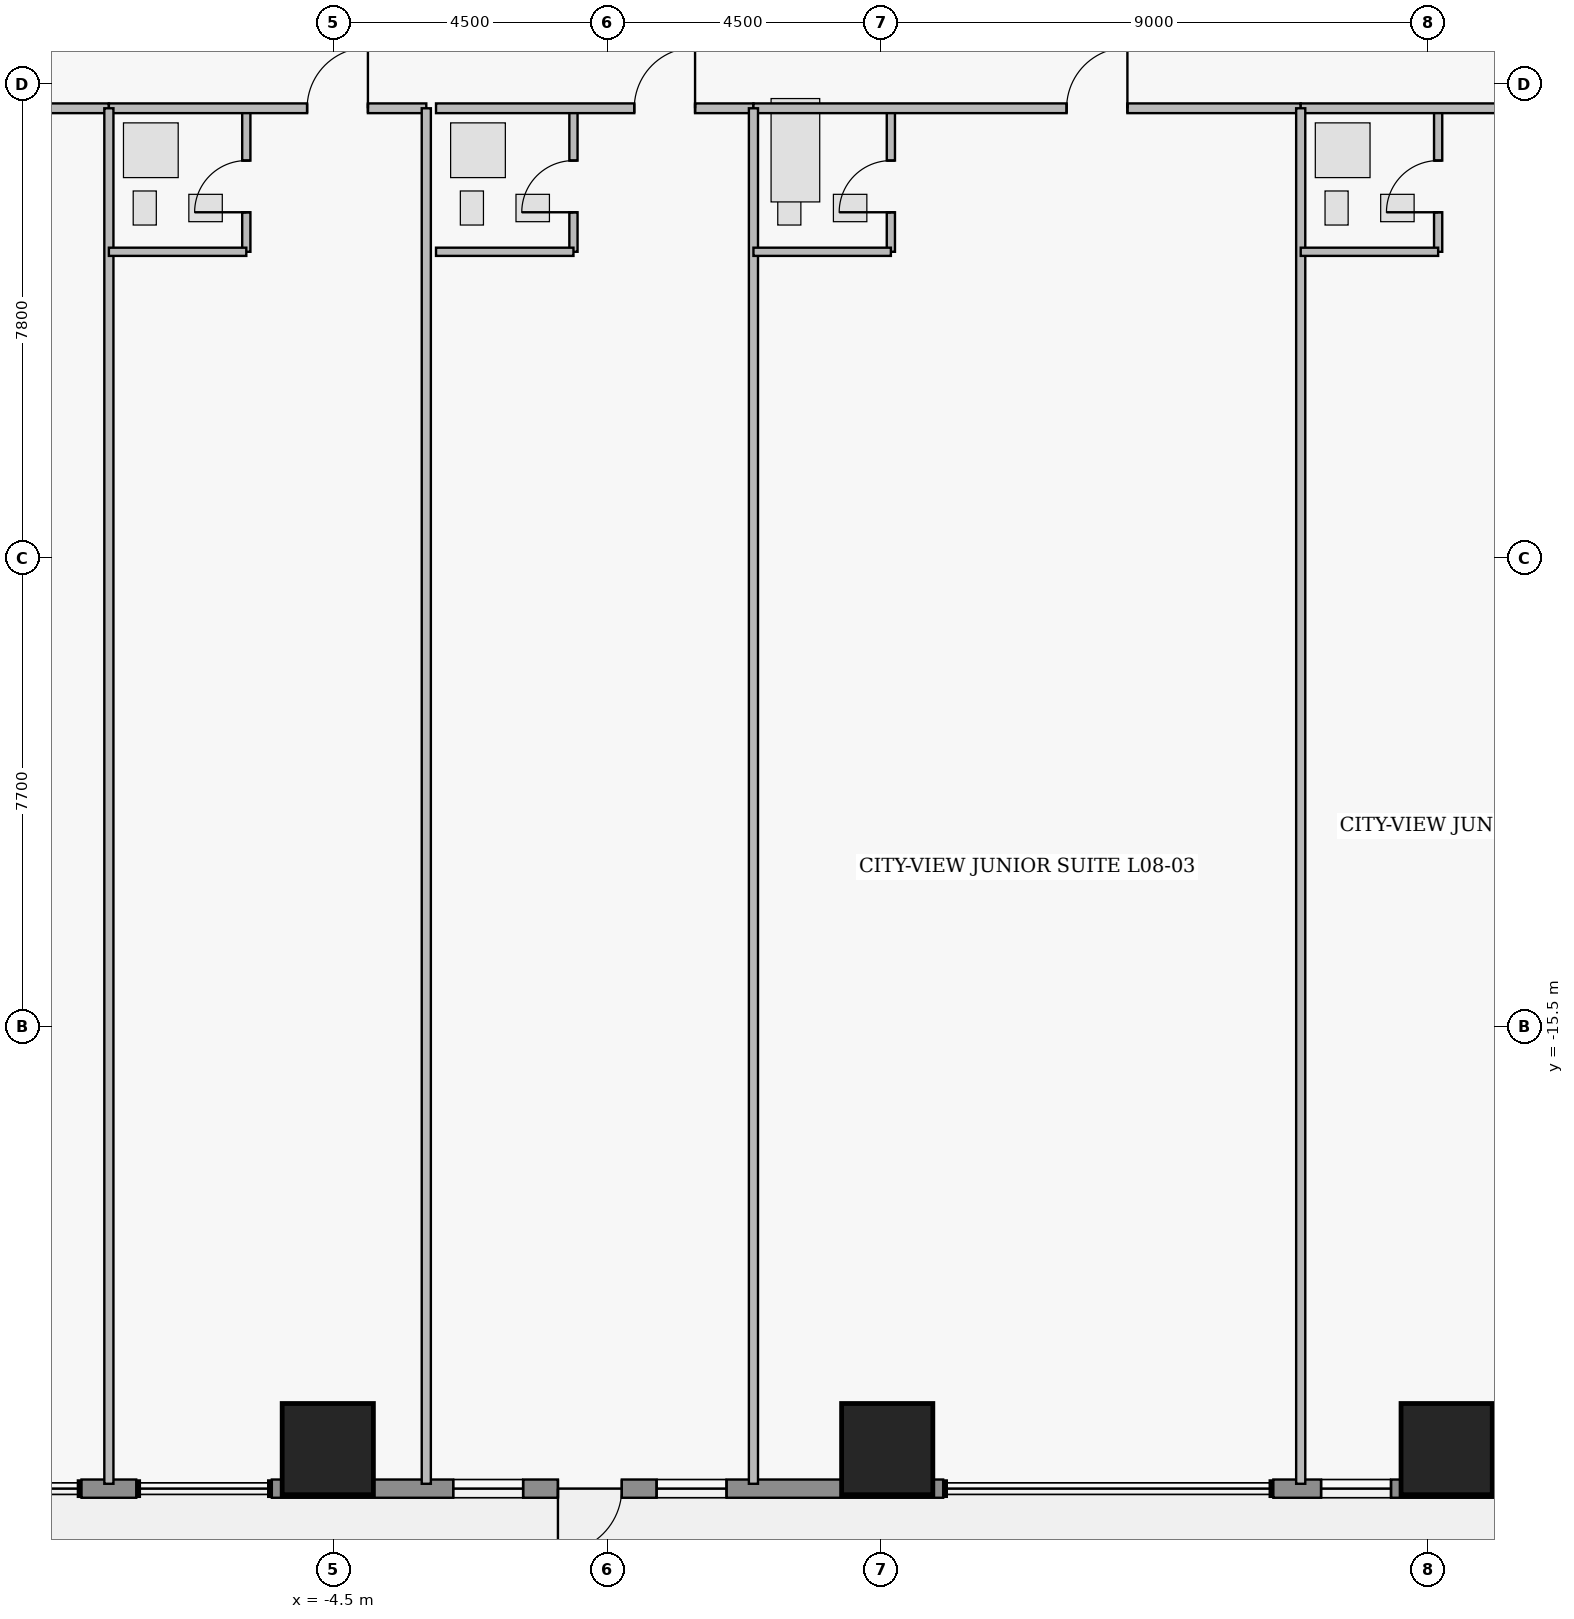
"""IFC4 building model, lengths in metres.
Left out: names, types, materials, properties, quantities, classifications, styles, units other than length and angle.
Written with IfcOpenShell. Run it as: python <this file> out.ifc"""

import sys

from ifc_helpers import new_model, si_unit, direction, frame, frame_2d, origin, origin_2d, place, context, subcontext, project, spatial, rectangle, extrude, element, fill, save


model = new_model("IFC4")
c1 = context("Model", 3, precision=1e-05, world=origin(), true_north=direction((0.0, 1.0)))
c2 = subcontext(c1, "Body", "Model", "MODEL_VIEW")
j1 = project(units=[si_unit("LENGTHUNIT", "METRE"), si_unit("PLANEANGLEUNIT", "RADIAN")], contexts=[c1])
p1 = place(None, origin())
s1 = spatial("IfcSite", under=j1, at=p1, CompositionType="ELEMENT")
p2 = place(p1, origin())
s2 = spatial("IfcBuilding", under=s1, at=p2, CompositionType="ELEMENT")
p3 = place(p2, frame((0.0, 0.0, 38.55)))
s3 = spatial("IfcBuildingStorey", under=s2, at=p3, CompositionType="ELEMENT", Elevation=38.55)
for number, where, z_axis, x_axis in (
    (1, (-4.6, -22.45, 0.0), (0.0, 0.0, 1.0), (1.0, 0.0, 0.0)),
    (2, (4.6, -22.45, 0.0), (0.0, 0.0, 1.0), (1.0, 0.0, 0.0)),
    (3, (13.8, -22.45, 0.0), (0.0, 0.0, 1.0), (1.0, 0.0, 0.0)),
):
    element("IfcColumn", number, at=place(p3, frame(where, z_axis=z_axis, x_axis=x_axis)), inside=s3, PredefinedType="COLUMN", context=c2, shape_type="SweptSolid", body=[
        extrude(rectangle(XDim=1.5, YDim=1.5, at=origin_2d()), origin(), (0.0, 0.0, 1.0), 3.65),
    ])
p4 = place(p3, frame((14.72, -23.1, 0.0), z_axis=(0.0, 0.0, 1.0), x_axis=(-1.0, 0.0, 0.0)))
e4 = element("IfcWall", 4, at=p4, inside=s3, PredefinedType="STANDARD", context=c2, shape_type="SweptSolid", body=[
    extrude(rectangle(XDim=3.77, YDim=0.3, at=frame_2d((1.885, 0.0))), origin(), (0.0, 0.0, 1.0), 3.43),
])
p5 = place(p4, frame((1.835, 0.0, 0.95)))
e5 = element("IfcOpeningElement", 5, at=p5, cuts=e4, PredefinedType="OPENING", context=c2, shape_type="SweptSolid", body=[
    extrude(rectangle(XDim=1.15, YDim=1.55, at=frame_2d((0.575, 0.775))), frame((0.0, 0.16, 0.0), z_axis=(0.0, -1.0, 0.0), x_axis=(1.0, 0.0, 0.0)), (0.0, 0.0, 1.0), 0.32),
])
p6 = place(p3, frame((5.52, -23.1, 0.0), z_axis=(0.0, 0.0, 1.0), x_axis=(-1.0, 0.0, 0.0)))
e6 = element("IfcWall", 6, at=p6, inside=s3, PredefinedType="STANDARD", context=c2, shape_type="SweptSolid", body=[
    extrude(rectangle(XDim=11.04, YDim=0.3, at=frame_2d((5.52, 0.0))), origin(), (0.0, 0.0, 1.0), 3.43),
])
p7 = place(p6, frame((5.285, 0.0, 0.0)))
e7 = element("IfcOpeningElement", 7, at=p7, cuts=e6, PredefinedType="OPENING", context=c2, shape_type="SweptSolid", body=[
    extrude(rectangle(XDim=1.05, YDim=2.2, at=frame_2d((0.525, 1.1))), frame((0.0, 0.16, 0.0), z_axis=(0.0, -1.0, 0.0), x_axis=(1.0, 0.0, 0.0)), (0.0, 0.0, 1.0), 0.32),
])
p8 = place(p6, frame((3.562, 0.0, 0.95)))
e8 = element("IfcOpeningElement", 8, at=p8, cuts=e6, PredefinedType="OPENING", context=c2, shape_type="SweptSolid", body=[
    extrude(rectangle(XDim=1.15, YDim=1.55, at=frame_2d((0.575, 0.775))), frame((0.0, 0.16, 0.0), z_axis=(0.0, -1.0, 0.0), x_axis=(1.0, 0.0, 0.0)), (0.0, 0.0, 1.0), 0.32),
])
p9 = place(p6, frame((6.907, 0.0, 0.95)))
e9 = element("IfcOpeningElement", 9, at=p9, cuts=e6, PredefinedType="OPENING", context=c2, shape_type="SweptSolid", body=[
    extrude(rectangle(XDim=1.15, YDim=1.55, at=frame_2d((0.575, 0.775))), frame((0.0, 0.16, 0.0), z_axis=(0.0, -1.0, 0.0), x_axis=(1.0, 0.0, 0.0)), (0.0, 0.0, 1.0), 0.32),
])
p10 = place(p3, frame((-7.75, -23.1, 0.0), z_axis=(0.0, 0.0, 1.0), x_axis=(-1.0, 0.0, 0.0)))
e10 = element("IfcWall", 10, at=p10, inside=s3, PredefinedType="STANDARD", context=c2, shape_type="SweptSolid", body=[
    extrude(rectangle(XDim=0.9, YDim=0.3, at=frame_2d((0.45, 0.0))), origin(), (0.0, 0.0, 1.0), 3.43),
])
p11 = place(p3, frame((-16.84, -0.4, 0.0), z_axis=(0.0, 0.0, 1.0), x_axis=(1.0, 0.0, 0.0)))
e11 = element("IfcWall", 11, at=p11, inside=s3, PredefinedType="PARTITIONING", context=c2, shape_type="SweptSolid", body=[
    extrude(rectangle(XDim=8.64, YDim=0.16, at=frame_2d((4.32, 0.0))), origin(), (0.0, 0.0, 1.0), 3.43),
])
p12 = place(p11, frame((4.97, 0.0, 0.0)))
e12 = element("IfcOpeningElement", 12, at=p12, cuts=e11, PredefinedType="OPENING", context=c2, shape_type="SweptSolid", body=[
    extrude(rectangle(XDim=1.0, YDim=2.15, at=frame_2d((0.5, 1.075))), frame((0.0, 0.09, 0.0), z_axis=(0.0, -1.0, 0.0), x_axis=(1.0, 0.0, 0.0)), (0.0, 0.0, 1.0), 0.18),
])
p13 = place(p3, frame((-5.94, -2.76, 0.0), z_axis=(0.0, 0.0, 1.0), x_axis=(0.0, 1.0, 0.0)))
e13 = element("IfcWall", 13, at=p13, inside=s3, PredefinedType="PLUMBINGWALL", context=c2, shape_type="SweptSolid", body=[
    extrude(rectangle(XDim=2.36, YDim=0.135, at=frame_2d((1.18, 0.0))), origin(), (0.0, 0.0, 1.0), 3.43),
])
p14 = place(p13, frame((0.65, 0.0, 0.0)))
e14 = element("IfcOpeningElement", 14, at=p14, cuts=e13, PredefinedType="OPENING", context=c2, shape_type="SweptSolid", body=[
    extrude(rectangle(XDim=0.85, YDim=2.1, at=frame_2d((0.425, 1.05))), frame((0.0, 0.077, 0.0), z_axis=(0.0, -1.0, 0.0), x_axis=(1.0, 0.0, 0.0)), (0.0, 0.0, 1.0), 0.155),
])
p15 = place(p3, frame((-8.2, -0.4, 0.0), z_axis=(0.0, 0.0, 1.0), x_axis=(1.0, 0.0, 0.0)))
e15 = element("IfcWall", 15, at=p15, inside=s3, PredefinedType="PARTITIONING", context=c2, shape_type="SweptSolid", body=[
    extrude(rectangle(XDim=5.22, YDim=0.16, at=frame_2d((2.61, 0.0))), origin(), (0.0, 0.0, 1.0), 3.43),
])
p16 = place(p15, frame((3.26, 0.0, 0.0)))
e16 = element("IfcOpeningElement", 16, at=p16, cuts=e15, PredefinedType="OPENING", context=c2, shape_type="SweptSolid", body=[
    extrude(rectangle(XDim=1.0, YDim=2.15, at=frame_2d((0.5, 1.075))), frame((0.0, 0.09, 0.0), z_axis=(0.0, -1.0, 0.0), x_axis=(1.0, 0.0, 0.0)), (0.0, 0.0, 1.0), 0.18),
])
p17 = place(p3, frame((-0.56, -2.76, 0.0), z_axis=(0.0, 0.0, 1.0), x_axis=(0.0, 1.0, 0.0)))
e17 = element("IfcWall", 17, at=p17, inside=s3, PredefinedType="PLUMBINGWALL", context=c2, shape_type="SweptSolid", body=[
    extrude(rectangle(XDim=2.36, YDim=0.135, at=frame_2d((1.18, 0.0))), origin(), (0.0, 0.0, 1.0), 3.43),
])
p18 = place(p17, frame((0.65, 0.0, 0.0)))
e18 = element("IfcOpeningElement", 18, at=p18, cuts=e17, PredefinedType="OPENING", context=c2, shape_type="SweptSolid", body=[
    extrude(rectangle(XDim=0.85, YDim=2.1, at=frame_2d((0.425, 1.05))), frame((0.0, 0.077, 0.0), z_axis=(0.0, -1.0, 0.0), x_axis=(1.0, 0.0, 0.0)), (0.0, 0.0, 1.0), 0.155),
])
p19 = place(p3, frame((-2.82, -0.4, 0.0), z_axis=(0.0, 0.0, 1.0), x_axis=(1.0, 0.0, 0.0)))
e19 = element("IfcWall", 19, at=p19, inside=s3, PredefinedType="PARTITIONING", context=c2, shape_type="SweptSolid", body=[
    extrude(rectangle(XDim=5.22, YDim=0.16, at=frame_2d((2.61, 0.0))), origin(), (0.0, 0.0, 1.0), 3.43),
])
p20 = place(p19, frame((3.26, 0.0, 0.0)))
e20 = element("IfcOpeningElement", 20, at=p20, cuts=e19, PredefinedType="OPENING", context=c2, shape_type="SweptSolid", body=[
    extrude(rectangle(XDim=1.0, YDim=2.15, at=frame_2d((0.5, 1.075))), frame((0.0, 0.09, 0.0), z_axis=(0.0, -1.0, 0.0), x_axis=(1.0, 0.0, 0.0)), (0.0, 0.0, 1.0), 0.18),
])
p21 = place(p3, frame((4.66, -2.76, 0.0), z_axis=(0.0, 0.0, 1.0), x_axis=(0.0, 1.0, 0.0)))
e21 = element("IfcWall", 21, at=p21, inside=s3, PredefinedType="PLUMBINGWALL", context=c2, shape_type="SweptSolid", body=[
    extrude(rectangle(XDim=2.36, YDim=0.135, at=frame_2d((1.18, 0.0))), origin(), (0.0, 0.0, 1.0), 2.668),
])
p22 = place(p21, frame((0.65, 0.0, 0.0)))
e22 = element("IfcOpeningElement", 22, at=p22, cuts=e21, PredefinedType="OPENING", context=c2, shape_type="SweptSolid", body=[
    extrude(rectangle(XDim=0.85, YDim=2.1, at=frame_2d((0.425, 1.05))), frame((0.0, 0.077, 0.0), z_axis=(0.0, -1.0, 0.0), x_axis=(1.0, 0.0, 0.0)), (0.0, 0.0, 1.0), 0.155),
])
p23 = place(p3, frame((2.4, -0.4, 0.0), z_axis=(0.0, 0.0, 1.0), x_axis=(1.0, 0.0, 0.0)))
e23 = element("IfcWall", 23, at=p23, inside=s3, PredefinedType="PARTITIONING", context=c2, shape_type="SweptSolid", body=[
    extrude(rectangle(XDim=9.0, YDim=0.16, at=frame_2d((4.5, 0.0))), origin(), (0.0, 0.0, 1.0), 3.43),
])
p24 = place(p23, frame((5.15, 0.0, 0.0)))
e24 = element("IfcOpeningElement", 24, at=p24, cuts=e23, PredefinedType="OPENING", context=c2, shape_type="SweptSolid", body=[
    extrude(rectangle(XDim=1.0, YDim=2.15, at=frame_2d((0.5, 1.075))), frame((0.0, 0.09, 0.0), z_axis=(0.0, -1.0, 0.0), x_axis=(1.0, 0.0, 0.0)), (0.0, 0.0, 1.0), 0.18),
])
p25 = place(p3, frame((13.66, -2.76, 0.0), z_axis=(0.0, 0.0, 1.0), x_axis=(0.0, 1.0, 0.0)))
e25 = element("IfcWall", 25, at=p25, inside=s3, PredefinedType="PLUMBINGWALL", context=c2, shape_type="SweptSolid", body=[
    extrude(rectangle(XDim=2.36, YDim=0.135, at=frame_2d((1.18, 0.0))), origin(), (0.0, 0.0, 1.0), 2.668),
])
p26 = place(p25, frame((0.65, 0.0, 0.0)))
e26 = element("IfcOpeningElement", 26, at=p26, cuts=e25, PredefinedType="OPENING", context=c2, shape_type="SweptSolid", body=[
    extrude(rectangle(XDim=0.85, YDim=2.1, at=frame_2d((0.425, 1.05))), frame((0.0, 0.077, 0.0), z_axis=(0.0, -1.0, 0.0), x_axis=(1.0, 0.0, 0.0)), (0.0, 0.0, 1.0), 0.155),
])
p27 = place(p3, frame((11.4, -0.4, 0.0), z_axis=(0.0, 0.0, 1.0), x_axis=(1.0, 0.0, 0.0)))
e27 = element("IfcWall", 27, at=p27, inside=s3, PredefinedType="PARTITIONING", context=c2, shape_type="SweptSolid", body=[
    extrude(rectangle(XDim=7.04, YDim=0.16, at=frame_2d((3.52, 0.0))), origin(), (0.0, 0.0, 1.0), 3.43),
])
p28 = place(p27, frame((4.17, 0.0, 0.0)))
e28 = element("IfcOpeningElement", 28, at=p28, cuts=e27, PredefinedType="OPENING", context=c2, shape_type="SweptSolid", body=[
    extrude(rectangle(XDim=1.0, YDim=2.15, at=frame_2d((0.5, 1.075))), frame((0.0, 0.09, 0.0), z_axis=(0.0, -1.0, 0.0), x_axis=(1.0, 0.0, 0.0)), (0.0, 0.0, 1.0), 0.18),
])
p29 = place(p3, frame((-8.2, -23.02, 0.0), z_axis=(0.0, 0.0, 1.0), x_axis=(0.0, 1.0, 0.0)))
e29 = element("IfcWall", 29, at=p29, inside=s3, PredefinedType="PARTITIONING", context=c2, shape_type="SweptSolid", body=[
    extrude(rectangle(XDim=22.62, YDim=0.15, at=frame_2d((11.31, 0.0))), origin(), (0.0, 0.0, 1.0), 3.43),
])
p30 = place(p3, frame((-8.2, -2.76, 0.0), z_axis=(0.0, 0.0, 1.0), x_axis=(1.0, 0.0, 0.0)))
e30 = element("IfcWall", 30, at=p30, inside=s3, PredefinedType="PLUMBINGWALL", context=c2, shape_type="SweptSolid", body=[
    extrude(rectangle(XDim=2.26, YDim=0.135, at=frame_2d((1.13, 0.0))), origin(), (0.0, 0.0, 1.0), 3.43),
])
p31 = place(p3, frame((-2.98, -23.02, 0.0), z_axis=(0.0, 0.0, 1.0), x_axis=(0.0, 1.0, 0.0)))
e31 = element("IfcWall", 31, at=p31, inside=s3, PredefinedType="PARTITIONING", context=c2, shape_type="SweptSolid", body=[
    extrude(rectangle(XDim=22.62, YDim=0.15, at=frame_2d((11.31, 0.0))), origin(), (0.0, 0.0, 1.0), 3.43),
])
p32 = place(p3, frame((-2.82, -2.76, 0.0), z_axis=(0.0, 0.0, 1.0), x_axis=(1.0, 0.0, 0.0)))
e32 = element("IfcWall", 32, at=p32, inside=s3, PredefinedType="PLUMBINGWALL", context=c2, shape_type="SweptSolid", body=[
    extrude(rectangle(XDim=2.26, YDim=0.135, at=frame_2d((1.13, 0.0))), origin(), (0.0, 0.0, 1.0), 3.43),
])
p33 = place(p3, frame((2.4, -23.02, 0.0), z_axis=(0.0, 0.0, 1.0), x_axis=(0.0, 1.0, 0.0)))
e33 = element("IfcWall", 33, at=p33, inside=s3, PredefinedType="PARTITIONING", context=c2, shape_type="SweptSolid", body=[
    extrude(rectangle(XDim=22.62, YDim=0.15, at=frame_2d((11.31, 0.0))), origin(), (0.0, 0.0, 1.0), 3.43),
])
p34 = place(p3, frame((2.4, -2.76, 0.0), z_axis=(0.0, 0.0, 1.0), x_axis=(1.0, 0.0, 0.0)))
e34 = element("IfcWall", 34, at=p34, inside=s3, PredefinedType="PLUMBINGWALL", context=c2, shape_type="SweptSolid", body=[
    extrude(rectangle(XDim=2.26, YDim=0.135, at=frame_2d((1.13, 0.0))), origin(), (0.0, 0.0, 1.0), 3.43),
])
p35 = place(p3, frame((11.4, -23.02, 0.0), z_axis=(0.0, 0.0, 1.0), x_axis=(0.0, 1.0, 0.0)))
e35 = element("IfcWall", 35, at=p35, inside=s3, PredefinedType="PARTITIONING", context=c2, shape_type="SweptSolid", body=[
    extrude(rectangle(XDim=22.62, YDim=0.15, at=frame_2d((11.31, 0.0))), origin(), (0.0, 0.0, 1.0), 3.43),
])
p36 = place(p3, frame((11.4, -2.76, 0.0), z_axis=(0.0, 0.0, 1.0), x_axis=(1.0, 0.0, 0.0)))
e36 = element("IfcWall", 36, at=p36, inside=s3, PredefinedType="PLUMBINGWALL", context=c2, shape_type="SweptSolid", body=[
    extrude(rectangle(XDim=2.26, YDim=0.135, at=frame_2d((1.13, 0.0))), origin(), (0.0, 0.0, 1.0), 3.43),
])
p37 = place(p5, origin())
e37 = element("IfcWindow", 37, at=p37, inside=s3, PartitioningType="SINGLE_PANEL", PredefinedType="WINDOW", context=c2, shape_type="SweptSolid", body=[
    extrude(rectangle(XDim=1.15, YDim=1.55, at=frame_2d((0.575, 0.775))), frame((0.0, 0.03, 0.0), z_axis=(0.0, -1.0, 0.0), x_axis=(1.0, 0.0, 0.0)), (0.0, 0.0, 1.0), 0.06),
])
fill(e5, e37)
p38 = place(p7, origin())
e38 = element("IfcDoor", 38, at=p38, inside=s3, OperationType="SINGLE_SWING_RIGHT", PredefinedType="DOOR", context=c2, shape_type="SweptSolid", body=[
    extrude(rectangle(XDim=1.05, YDim=2.2, at=frame_2d((0.525, 1.1))), frame((0.0, 0.025, 0.0), z_axis=(0.0, -1.0, 0.0), x_axis=(1.0, 0.0, 0.0)), (0.0, 0.0, 1.0), 0.05),
])
fill(e7, e38)
p39 = place(p8, origin())
e39 = element("IfcWindow", 39, at=p39, inside=s3, PartitioningType="SINGLE_PANEL", PredefinedType="WINDOW", context=c2, shape_type="SweptSolid", body=[
    extrude(rectangle(XDim=1.15, YDim=1.55, at=frame_2d((0.575, 0.775))), frame((0.0, 0.03, 0.0), z_axis=(0.0, -1.0, 0.0), x_axis=(1.0, 0.0, 0.0)), (0.0, 0.0, 1.0), 0.06),
])
fill(e8, e39)
p40 = place(p9, origin())
e40 = element("IfcWindow", 40, at=p40, inside=s3, PartitioningType="SINGLE_PANEL", PredefinedType="WINDOW", context=c2, shape_type="SweptSolid", body=[
    extrude(rectangle(XDim=1.15, YDim=1.55, at=frame_2d((0.575, 0.775))), frame((0.0, 0.03, 0.0), z_axis=(0.0, -1.0, 0.0), x_axis=(1.0, 0.0, 0.0)), (0.0, 0.0, 1.0), 0.06),
])
fill(e9, e40)
p41 = place(p14, origin())
e41 = element("IfcDoor", 41, at=p41, inside=s3, OperationType="SINGLE_SWING_LEFT", PredefinedType="DOOR", context=c2, shape_type="SweptSolid", body=[
    extrude(rectangle(XDim=0.85, YDim=2.1, at=frame_2d((0.425, 1.05))), frame((0.0, 0.025, 0.0), z_axis=(0.0, -1.0, 0.0), x_axis=(1.0, 0.0, 0.0)), (0.0, 0.0, 1.0), 0.05),
])
fill(e14, e41)
p42 = place(p16, origin())
e42 = element("IfcDoor", 42, at=p42, inside=s3, OperationType="SINGLE_SWING_RIGHT", PredefinedType="DOOR", context=c2, shape_type="SweptSolid", body=[
    extrude(rectangle(XDim=1.0, YDim=2.15, at=frame_2d((0.5, 1.075))), frame((0.0, 0.025, 0.0), z_axis=(0.0, -1.0, 0.0), x_axis=(1.0, 0.0, 0.0)), (0.0, 0.0, 1.0), 0.05),
])
fill(e16, e42)
p43 = place(p18, origin())
e43 = element("IfcDoor", 43, at=p43, inside=s3, OperationType="SINGLE_SWING_LEFT", PredefinedType="DOOR", context=c2, shape_type="SweptSolid", body=[
    extrude(rectangle(XDim=0.85, YDim=2.1, at=frame_2d((0.425, 1.05))), frame((0.0, 0.025, 0.0), z_axis=(0.0, -1.0, 0.0), x_axis=(1.0, 0.0, 0.0)), (0.0, 0.0, 1.0), 0.05),
])
fill(e18, e43)
p44 = place(p20, origin())
e44 = element("IfcDoor", 44, at=p44, inside=s3, OperationType="SINGLE_SWING_RIGHT", PredefinedType="DOOR", context=c2, shape_type="SweptSolid", body=[
    extrude(rectangle(XDim=1.0, YDim=2.15, at=frame_2d((0.5, 1.075))), frame((0.0, 0.025, 0.0), z_axis=(0.0, -1.0, 0.0), x_axis=(1.0, 0.0, 0.0)), (0.0, 0.0, 1.0), 0.05),
])
fill(e20, e44)
p45 = place(p22, origin())
e45 = element("IfcDoor", 45, at=p45, inside=s3, OperationType="SINGLE_SWING_LEFT", PredefinedType="DOOR", context=c2, shape_type="SweptSolid", body=[
    extrude(rectangle(XDim=0.85, YDim=2.1, at=frame_2d((0.425, 1.05))), frame((0.0, 0.025, 0.0), z_axis=(0.0, -1.0, 0.0), x_axis=(1.0, 0.0, 0.0)), (0.0, 0.0, 1.0), 0.05),
])
fill(e22, e45)
p46 = place(p24, origin())
e46 = element("IfcDoor", 46, at=p46, inside=s3, OperationType="SINGLE_SWING_RIGHT", PredefinedType="DOOR", context=c2, shape_type="SweptSolid", body=[
    extrude(rectangle(XDim=1.0, YDim=2.15, at=frame_2d((0.5, 1.075))), frame((0.0, 0.025, 0.0), z_axis=(0.0, -1.0, 0.0), x_axis=(1.0, 0.0, 0.0)), (0.0, 0.0, 1.0), 0.05),
])
fill(e24, e46)
p47 = place(p26, origin())
e47 = element("IfcDoor", 47, at=p47, inside=s3, OperationType="SINGLE_SWING_LEFT", PredefinedType="DOOR", context=c2, shape_type="SweptSolid", body=[
    extrude(rectangle(XDim=0.85, YDim=2.1, at=frame_2d((0.425, 1.05))), frame((0.0, 0.025, 0.0), z_axis=(0.0, -1.0, 0.0), x_axis=(1.0, 0.0, 0.0)), (0.0, 0.0, 1.0), 0.05),
])
fill(e26, e47)
save(model, sys.argv[1])
